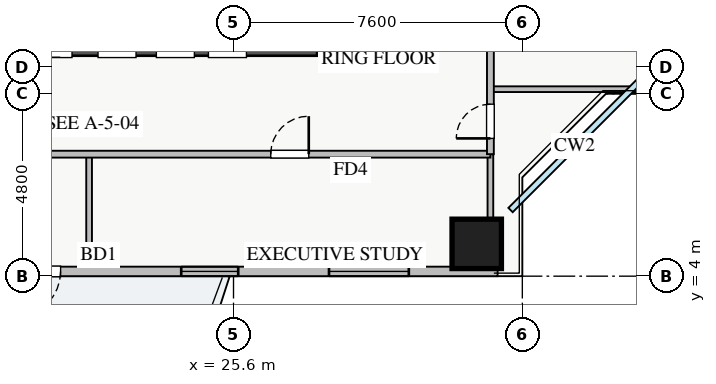
"""IFC4 building model, lengths in metres.
Left out: names, types, materials, properties, quantities, classifications, styles, units other than length and angle.
Written with IfcOpenShell. Run it as: python <this file> out.ifc"""

import sys

from ifc_helpers import new_model, si_unit, direction, frame, frame_2d, origin, origin_2d, place, context, subcontext, project, spatial, rectangle, extrude, source, transform, mapped, element, fill, save


model = new_model("IFC4")
c1 = context("Model", 3, precision=1e-05, world=origin(), true_north=direction((0.0, 1.0)))
c2 = subcontext(c1, "Body", "Model", "MODEL_VIEW")
j1 = project(units=[si_unit("LENGTHUNIT", "METRE"), si_unit("PLANEANGLEUNIT", "RADIAN")], contexts=[c1])
p1 = place(None, origin())
s1 = spatial("IfcSite", under=j1, at=p1, CompositionType="ELEMENT")
p2 = place(p1, origin())
s2 = spatial("IfcBuilding", under=s1, at=p2, CompositionType="ELEMENT")
p3 = place(p2, frame((0.0, 0.0, 63.25)))
s3 = spatial("IfcBuildingStorey", under=s2, at=p3, CompositionType="ELEMENT", Elevation=63.25)
p4 = place(p3, frame((10.2, 10.2, 0.0), z_axis=(0.0, 0.0, 1.0), x_axis=(1.0, 0.0, 0.0)))
e1 = element("IfcWall", 1, at=p4, inside=s3, PredefinedType="SHEAR", context=c2, shape_type="SweptSolid", body=[
    extrude(rectangle(XDim=17.6, YDim=0.8, at=frame_2d((8.8, 0.0))), origin(), (0.0, 0.0, 1.0), 3.25),
])
p5 = place(p4, frame((1.15, 0.0, 0.0)))
e2 = element("IfcOpeningElement", 2, at=p5, cuts=e1, PredefinedType="OPENING", context=c2, shape_type="SweptSolid", body=[
    extrude(rectangle(XDim=1.1, YDim=2.05, at=frame_2d((0.55, 1.025))), frame((0.0, 0.41, 0.0), z_axis=(0.0, -1.0, 0.0), x_axis=(1.0, 0.0, 0.0)), (0.0, 0.0, 1.0), 0.82),
])
p6 = place(p4, frame((8.3, 0.0, 0.0)))
e3 = element("IfcOpeningElement", 3, at=p6, cuts=e1, PredefinedType="OPENING", context=c2, shape_type="SweptSolid", body=[
    extrude(rectangle(XDim=1.1, YDim=2.05, at=frame_2d((0.55, 1.025))), frame((0.0, 0.41, 0.0), z_axis=(0.0, -1.0, 0.0), x_axis=(1.0, 0.0, 0.0)), (0.0, 0.0, 1.0), 0.82),
])
p7 = place(p4, frame((10.05, 0.0, 0.0)))
e4 = element("IfcOpeningElement", 4, at=p7, cuts=e1, PredefinedType="OPENING", context=c2, shape_type="SweptSolid", body=[
    extrude(rectangle(XDim=1.1, YDim=2.05, at=frame_2d((0.55, 1.025))), frame((0.0, 0.41, 0.0), z_axis=(0.0, -1.0, 0.0), x_axis=(1.0, 0.0, 0.0)), (0.0, 0.0, 1.0), 0.82),
])
p8 = place(p4, frame((14.74, 0.0, 0.0)))
e5 = element("IfcOpeningElement", 5, at=p8, cuts=e1, PredefinedType="OPENING", context=c2, shape_type="SweptSolid", body=[
    extrude(rectangle(XDim=1.0, YDim=2.05, at=frame_2d((0.5, 1.025))), frame((0.0, 0.41, 0.0), z_axis=(0.0, -1.0, 0.0), x_axis=(1.0, 0.0, 0.0)), (0.0, 0.0, 1.0), 0.82),
])
p9 = place(p4, frame((11.835, 0.0, 0.0)))
e6 = element("IfcOpeningElement", 6, at=p9, cuts=e1, PredefinedType="OPENING", context=c2, shape_type="SweptSolid", body=[
    extrude(rectangle(XDim=1.0, YDim=2.05, at=frame_2d((0.5, 1.025))), frame((0.0, 0.41, 0.0), z_axis=(0.0, -1.0, 0.0), x_axis=(1.0, 0.0, 0.0)), (0.0, 0.0, 1.0), 0.82),
])
p10 = place(p4, frame((13.37, 0.0, 0.0)))
e7 = element("IfcOpeningElement", 7, at=p10, cuts=e1, PredefinedType="OPENING", context=c2, shape_type="SweptSolid", body=[
    extrude(rectangle(XDim=1.0, YDim=2.05, at=frame_2d((0.5, 1.025))), frame((0.0, 0.41, 0.0), z_axis=(0.0, -1.0, 0.0), x_axis=(1.0, 0.0, 0.0)), (0.0, 0.0, 1.0), 0.82),
])
m1 = source(origin(), c2, "Body", "SweptSolid", [
    extrude(rectangle(XDim=1.3, YDim=1.3, at=origin_2d()), origin(), (0.0, 0.0, 1.0), 3.25),
])
p11 = place(p3, frame((32.0, 4.85, 0.0), z_axis=(0.0, 0.0, 1.0), x_axis=(1.0, 0.0, 0.0)))
e8 = element("IfcColumn", 8, at=p11, inside=s3, PredefinedType="COLUMN", context=c2, shape_type="MappedRepresentation", body=[
    mapped(m1, transform((0.0, 0.0, 0.0), x_axis=(1.0, 0.0, 0.0), y_axis=(0.0, 1.0, 0.0), z_axis=(0.0, 0.0, 1.0), scale=1.0)),
])
p12 = place(p3, frame((5.45, 4.125, 0.0), z_axis=(0.0, 0.0, 1.0), x_axis=(1.0, 0.0, 0.0)))
e9 = element("IfcWall", 9, at=p12, inside=s3, PredefinedType="STANDARD", context=c2, shape_type="SweptSolid", body=[
    extrude(rectangle(XDim=27.1, YDim=0.25, at=frame_2d((13.55, 0.0))), origin(), (0.0, 0.0, 1.0), 2.61),
])
p13 = place(p12, frame((14.4, 0.0, 0.0)))
e10 = element("IfcOpeningElement", 10, at=p13, cuts=e9, PredefinedType="OPENING", context=c2, shape_type="SweptSolid", body=[
    extrude(rectangle(XDim=1.2, YDim=2.1, at=frame_2d((0.6, 1.05))), frame((0.0, 0.135, 0.0), z_axis=(0.0, -1.0, 0.0), x_axis=(1.0, 0.0, 0.0)), (0.0, 0.0, 1.0), 0.27),
])
p14 = place(p12, frame((1.465, 0.0, 0.9)))
e11 = element("IfcOpeningElement", 11, at=p14, cuts=e9, PredefinedType="OPENING", context=c2, shape_type="SweptSolid", body=[
    extrude(rectangle(XDim=1.5, YDim=1.5, at=frame_2d((0.75, 0.75))), frame((0.0, 0.135, 0.0), z_axis=(0.0, -1.0, 0.0), x_axis=(1.0, 0.0, 0.0)), (0.0, 0.0, 1.0), 0.27),
])
p15 = place(p12, frame((9.263, 0.0, 0.9)))
e12 = element("IfcOpeningElement", 12, at=p15, cuts=e9, PredefinedType="OPENING", context=c2, shape_type="SweptSolid", body=[
    extrude(rectangle(XDim=1.8, YDim=1.45, at=frame_2d((0.9, 0.725))), frame((0.0, 0.135, 0.0), z_axis=(0.0, -1.0, 0.0), x_axis=(1.0, 0.0, 0.0)), (0.0, 0.0, 1.0), 0.27),
])
p16 = place(p12, frame((18.774, 0.0, 0.9)))
e13 = element("IfcOpeningElement", 13, at=p16, cuts=e9, PredefinedType="OPENING", context=c2, shape_type="SweptSolid", body=[
    extrude(rectangle(XDim=1.5, YDim=1.5, at=frame_2d((0.75, 0.75))), frame((0.0, 0.135, 0.0), z_axis=(0.0, -1.0, 0.0), x_axis=(1.0, 0.0, 0.0)), (0.0, 0.0, 1.0), 0.27),
])
p17 = place(p12, frame((22.663, 0.0, 0.9)))
e14 = element("IfcOpeningElement", 14, at=p17, cuts=e9, PredefinedType="OPENING", context=c2, shape_type="SweptSolid", body=[
    extrude(rectangle(XDim=2.1, YDim=1.48, at=frame_2d((1.05, 0.74))), frame((0.0, 0.135, 0.0), z_axis=(0.0, -1.0, 0.0), x_axis=(1.0, 0.0, 0.0)), (0.0, 0.0, 1.0), 0.27),
])
p18 = place(p12, frame((5.099, 0.0, 0.9)))
e15 = element("IfcOpeningElement", 15, at=p18, cuts=e9, PredefinedType="OPENING", context=c2, shape_type="SweptSolid", body=[
    extrude(rectangle(XDim=2.4, YDim=1.5, at=frame_2d((1.2, 0.75))), frame((0.0, 0.135, 0.0), z_axis=(0.0, -1.0, 0.0), x_axis=(1.0, 0.0, 0.0)), (0.0, 0.0, 1.0), 0.27),
])
for number, where, z_axis, x_axis in (
    (16, (21.8, 4.25, 0.0), (0.0, 0.0, 1.0), (0.0, 1.0, 0.0)),
    (17, (32.36, 4.25, 0.0), (0.0, 0.0, 1.0), (0.0, 1.0, 0.0)),
):
    element("IfcWall", number, at=place(p3, frame(where, z_axis=z_axis, x_axis=x_axis)), inside=s3, PredefinedType="PARTITIONING", context=c2, shape_type="SweptSolid", body=[
        extrude(rectangle(XDim=2.96, YDim=0.15, at=frame_2d((1.48, 0.0))), origin(), (0.0, 0.0, 1.0), 3.07),
    ])
p19 = place(p3, frame((8.75, 7.21, 0.0), z_axis=(0.0, 0.0, 1.0), x_axis=(1.0, 0.0, 0.0)))
e18 = element("IfcWall", 18, at=p19, inside=s3, PredefinedType="PARTITIONING", context=c2, shape_type="SweptSolid", body=[
    extrude(rectangle(XDim=23.61, YDim=0.18, at=frame_2d((11.805, 0.0))), origin(), (0.0, 0.0, 1.0), 3.07),
])
p20 = place(p19, frame((6.025, 0.0, 0.0)))
e19 = element("IfcOpeningElement", 19, at=p20, cuts=e18, PredefinedType="OPENING", context=c2, shape_type="SweptSolid", body=[
    extrude(rectangle(XDim=1.0, YDim=2.05, at=frame_2d((0.5, 1.025))), frame((0.0, 0.1, 0.0), z_axis=(0.0, -1.0, 0.0), x_axis=(1.0, 0.0, 0.0)), (0.0, 0.0, 1.0), 0.2),
])
p21 = place(p19, frame((17.83, 0.0, 0.0)))
e20 = element("IfcOpeningElement", 20, at=p21, cuts=e18, PredefinedType="OPENING", context=c2, shape_type="SweptSolid", body=[
    extrude(rectangle(XDim=1.0, YDim=2.05, at=frame_2d((0.5, 1.025))), frame((0.0, 0.1, 0.0), z_axis=(0.0, -1.0, 0.0), x_axis=(1.0, 0.0, 0.0)), (0.0, 0.0, 1.0), 0.2),
])
p22 = place(p3, frame((32.36, 8.92, 0.0), z_axis=(0.0, 0.0, 1.0), x_axis=(1.0, 0.0, 0.0)))
e21 = element("IfcWall", 21, at=p22, inside=s3, PredefinedType="PARTITIONING", context=c2, shape_type="SweptSolid", body=[
    extrude(rectangle(XDim=5.39, YDim=0.15, at=frame_2d((2.695, 0.0))), origin(), (0.0, 0.0, 1.0), 3.07),
])
p23 = place(p3, frame((32.36, 7.21, 0.0), z_axis=(0.0, 0.0, 1.0), x_axis=(0.0, 1.0, 0.0)))
e22 = element("IfcWall", 22, at=p23, inside=s3, PredefinedType="PARTITIONING", context=c2, shape_type="SweptSolid", body=[
    extrude(rectangle(XDim=31.23, YDim=0.18, at=frame_2d((15.615, 0.0))), origin(), (0.0, 0.0, 1.0), 2.865),
])
p24 = place(p23, frame((30.09, 0.0, 0.0)))
e23 = element("IfcOpeningElement", 23, at=p24, cuts=e22, PredefinedType="OPENING", context=c2, shape_type="SweptSolid", body=[
    extrude(rectangle(XDim=0.9, YDim=2.05, at=frame_2d((0.45, 1.025))), frame((0.0, 0.1, 0.0), z_axis=(0.0, -1.0, 0.0), x_axis=(1.0, 0.0, 0.0)), (0.0, 0.0, 1.0), 0.2),
])
p25 = place(p23, frame((0.415, 0.0, 0.0)))
e24 = element("IfcOpeningElement", 24, at=p25, cuts=e22, PredefinedType="OPENING", context=c2, shape_type="SweptSolid", body=[
    extrude(rectangle(XDim=0.9, YDim=2.05, at=frame_2d((0.45, 1.025))), frame((0.0, 0.1, 0.0), z_axis=(0.0, -1.0, 0.0), x_axis=(1.0, 0.0, 0.0)), (0.0, 0.0, 1.0), 0.2),
])
p26 = place(p23, frame((7.975, 0.0, 0.0)))
e25 = element("IfcOpeningElement", 25, at=p26, cuts=e22, PredefinedType="OPENING", context=c2, shape_type="SweptSolid", body=[
    extrude(rectangle(XDim=1.0, YDim=2.05, at=frame_2d((0.5, 1.025))), frame((0.0, 0.1, 0.0), z_axis=(0.0, -1.0, 0.0), x_axis=(1.0, 0.0, 0.0)), (0.0, 0.0, 1.0), 0.2),
])
p27 = place(p23, frame((18.5, 0.0, 0.0)))
e26 = element("IfcOpeningElement", 26, at=p27, cuts=e22, PredefinedType="OPENING", context=c2, shape_type="SweptSolid", body=[
    extrude(rectangle(XDim=1.0, YDim=2.05, at=frame_2d((0.5, 1.025))), frame((0.0, 0.1, 0.0), z_axis=(0.0, -1.0, 0.0), x_axis=(1.0, 0.0, 0.0)), (0.0, 0.0, 1.0), 0.2),
])
m2 = source(origin(), c2, "Body", "SweptSolid", [
    extrude(rectangle(XDim=1.2, YDim=2.1, at=frame_2d((0.6, 1.05))), frame((0.0, 0.025, 0.0), z_axis=(0.0, -1.0, 0.0), x_axis=(1.0, 0.0, 0.0)), (0.0, 0.0, 1.0), 0.05),
])
p28 = place(p13, frame((1.2, 0.0, 0.0), z_axis=(0.0, 0.0, 1.0), x_axis=(-1.0, 0.0, 0.0)))
e27 = element("IfcDoor", 27, at=p28, inside=s3, OperationType="SINGLE_SWING_LEFT", PredefinedType="DOOR", context=c2, shape_type="MappedRepresentation", body=[
    mapped(m2, transform((0.0, 0.0, 0.0), x_axis=(1.0, 0.0, 0.0), y_axis=(0.0, 1.0, 0.0), z_axis=(0.0, 0.0, 1.0), scale=1.0)),
])
fill(e10, e27)
m3 = source(origin(), c2, "Body", "SweptSolid", [
    extrude(rectangle(XDim=1.5, YDim=1.5, at=frame_2d((0.75, 0.75))), frame((0.0, 0.03, 0.0), z_axis=(0.0, -1.0, 0.0), x_axis=(1.0, 0.0, 0.0)), (0.0, 0.0, 1.0), 0.06),
])
p29 = place(p16, origin())
e28 = element("IfcWindow", 28, at=p29, inside=s3, PartitioningType="DOUBLE_PANEL_VERTICAL", PredefinedType="WINDOW", context=c2, shape_type="MappedRepresentation", body=[
    mapped(m3, transform((0.0, 0.0, 0.0), x_axis=(1.0, 0.0, 0.0), y_axis=(0.0, 1.0, 0.0), z_axis=(0.0, 0.0, 1.0), scale=1.0)),
])
fill(e13, e28)
m4 = source(origin(), c2, "Body", "SweptSolid", [
    extrude(rectangle(XDim=2.1, YDim=1.48, at=frame_2d((1.05, 0.74))), frame((0.0, 0.03, 0.0), z_axis=(0.0, -1.0, 0.0), x_axis=(1.0, 0.0, 0.0)), (0.0, 0.0, 1.0), 0.06),
])
p30 = place(p17, origin())
e29 = element("IfcWindow", 29, at=p30, inside=s3, PartitioningType="TRIPLE_PANEL_VERTICAL", PredefinedType="WINDOW", context=c2, shape_type="MappedRepresentation", body=[
    mapped(m4, transform((0.0, 0.0, 0.0), x_axis=(1.0, 0.0, 0.0), y_axis=(0.0, 1.0, 0.0), z_axis=(0.0, 0.0, 1.0), scale=1.0)),
])
fill(e14, e29)
m5 = source(origin(), c2, "Body", "SweptSolid", [
    extrude(rectangle(XDim=1.0, YDim=2.05, at=frame_2d((0.5, 1.025))), frame((0.0, 0.025, 0.0), z_axis=(0.0, -1.0, 0.0), x_axis=(1.0, 0.0, 0.0)), (0.0, 0.0, 1.0), 0.05),
])
p31 = place(p21, origin())
e30 = element("IfcDoor", 30, at=p31, inside=s3, OperationType="SINGLE_SWING_RIGHT", PredefinedType="DOOR", context=c2, shape_type="MappedRepresentation", body=[
    mapped(m5, transform((0.0, 0.0, 0.0), x_axis=(1.0, 0.0, 0.0), y_axis=(0.0, 1.0, 0.0), z_axis=(0.0, 0.0, 1.0), scale=1.0)),
])
fill(e20, e30)
m6 = source(origin(), c2, "Body", "SweptSolid", [
    extrude(rectangle(XDim=0.9, YDim=2.05, at=frame_2d((0.45, 1.025))), frame((0.0, 0.025, 0.0), z_axis=(0.0, -1.0, 0.0), x_axis=(1.0, 0.0, 0.0)), (0.0, 0.0, 1.0), 0.05),
])
p32 = place(p25, origin())
e31 = element("IfcDoor", 31, at=p32, inside=s3, OperationType="SINGLE_SWING_LEFT", PredefinedType="DOOR", context=c2, shape_type="MappedRepresentation", body=[
    mapped(m6, transform((0.0, 0.0, 0.0), x_axis=(1.0, 0.0, 0.0), y_axis=(0.0, 1.0, 0.0), z_axis=(0.0, 0.0, 1.0), scale=1.0)),
])
fill(e24, e31)
save(model, sys.argv[1])
